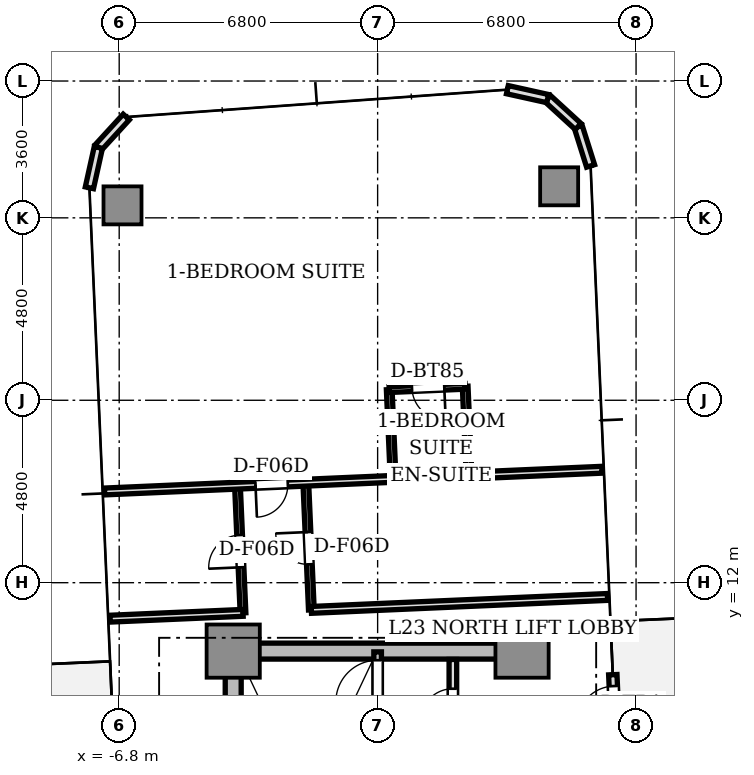
"""IFC4 building model, lengths in metres.
Left out: names, types, materials, properties, quantities, classifications, styles, units other than length and angle.
Written with IfcOpenShell. Run it as: python <this file> out.ifc"""

import sys

from ifc_helpers import new_model, si_unit, direction, frame, frame_2d, origin, origin_2d, place, context, subcontext, project, spatial, rectangle, extrude, source, transform, mapped, element, fill, save


model = new_model("IFC4")
c1 = context("Model", 3, precision=1e-05, world=origin(), true_north=direction((0.0, 1.0)))
c2 = subcontext(c1, "Body", "Model", "MODEL_VIEW")
j1 = project(units=[si_unit("LENGTHUNIT", "METRE"), si_unit("PLANEANGLEUNIT", "RADIAN")], contexts=[c1])
p1 = place(None, origin())
s1 = spatial("IfcSite", under=j1, at=p1, CompositionType="ELEMENT")
p2 = place(p1, origin())
s2 = spatial("IfcBuilding", under=s1, at=p2, CompositionType="ELEMENT")
p3 = place(p2, frame((0.0, 0.0, 86.85)))
s3 = spatial("IfcBuildingStorey", under=s2, at=p3, CompositionType="ELEMENT", Elevation=86.85)
p4 = place(p3, frame((-3.55, 10.2, 0.0), z_axis=(0.0, 0.0, 1.0), x_axis=(1.0, 0.0, 0.0)))
e1 = element("IfcWall", 1, at=p4, inside=s3, PredefinedType="SHEAR", context=c2, shape_type="SweptSolid", body=[
    extrude(rectangle(XDim=7.1, YDim=0.42, at=frame_2d((3.55, 0.0))), origin(), (0.0, 0.0, 1.0), 3.11),
])
p5 = place(p3, frame((-3.8, 2.85, 0.0), z_axis=(0.0, 0.0, 1.0), x_axis=(0.0, 1.0, 0.0)))
e2 = element("IfcWall", 2, at=p5, inside=s3, PredefinedType="SHEAR", context=c2, shape_type="SweptSolid", body=[
    extrude(rectangle(XDim=6.9, YDim=0.42, at=frame_2d((3.45, 0.0))), origin(), (0.0, 0.0, 1.0), 3.11),
])
m1 = source(origin(), c2, "Body", "SweptSolid", [
    extrude(rectangle(XDim=1.4, YDim=1.4, at=origin_2d()), origin(), (0.0, 0.0, 1.0), 3.11),
])
for number, where, z_axis, x_axis in (
    (3, (-3.8, 10.2, 0.0), (0.0, 0.0, 1.0), (1.0, 0.0, 0.0)),
    (4, (3.8, 10.2, 0.0), (0.0, 0.0, 1.0), (1.0, 0.0, 0.0)),
):
    element("IfcColumn", number, at=place(p3, frame(where, z_axis=z_axis, x_axis=x_axis)), inside=s3, PredefinedType="COLUMN", context=c2, shape_type="MappedRepresentation", body=[
        mapped(m1, transform((0.0, 0.0, 0.0), scale=1.0)),
    ])
m2 = source(origin(), c2, "Body", "SweptSolid", [
    extrude(rectangle(XDim=1.0, YDim=1.0, at=origin_2d()), origin(), (0.0, 0.0, 1.0), 3.11),
])
for number, where, z_axis, x_axis in (
    (5, (4.776, 22.43, 0.0), (0.0, 0.0, 1.0), (1.0, 0.0, 0.0)),
    (6, (-6.713, 21.928, 0.0), (0.0, 0.0, 1.0), (1.0, 0.0, 0.0)),
):
    element("IfcColumn", number, at=place(p3, frame(where, z_axis=z_axis, x_axis=x_axis)), inside=s3, PredefinedType="COLUMN", context=c2, shape_type="MappedRepresentation", body=[
        mapped(m2, transform((0.0, 0.0, 0.0), scale=1.0)),
    ])
p6 = place(p3, frame((6.306, 6.882, 0.0), z_axis=(0.0, 0.0, 1.0), x_axis=(-0.043672655174, 0.999045894436, 0.0)))
e7 = element("IfcWall", 7, at=p6, inside=s3, PredefinedType="STANDARD", context=c2, shape_type="SweptSolid", body=[
    extrude(rectangle(XDim=2.7, YDim=0.22, at=frame_2d((1.35, 0.0))), origin(), (0.0, 0.0, 1.0), 3.11),
])
p7 = place(p6, frame((1.4, 0.0, 0.0)))
e8 = element("IfcOpeningElement", 8, at=p7, cuts=e7, PredefinedType="OPENING", context=c2, shape_type="SweptSolid", body=[
    extrude(rectangle(XDim=1.0, YDim=2.2, at=frame_2d((0.5, 1.1))), frame((0.0, 0.12, 0.0), z_axis=(0.0, -1.0, 0.0), x_axis=(1.0, 0.0, 0.0)), (0.0, 0.0, 1.0), 0.24),
])
p8 = place(p3, frame((5.604, 22.966, 0.0), z_axis=(0.0, 0.0, 1.0), x_axis=(-0.300755105707, 0.953701403161, 0.0)))
e9 = element("IfcWall", 9, at=p8, inside=s3, PredefinedType="STANDARD", context=c2, shape_type="SweptSolid", body=[
    extrude(rectangle(XDim=1.087, YDim=0.22, at=frame_2d((0.543, 0.0))), origin(), (0.0, 0.0, 1.0), 3.11),
])
p9 = place(p3, frame((5.277, 24.003, 0.0), z_axis=(0.0, 0.0, 1.0), x_axis=(-0.737312600672, 0.675551721847, 0.0)))
e10 = element("IfcWall", 10, at=p9, inside=s3, PredefinedType="STANDARD", context=c2, shape_type="SweptSolid", body=[
    extrude(rectangle(XDim=1.087, YDim=0.22, at=frame_2d((0.543, 0.0))), origin(), (0.0, 0.0, 1.0), 3.11),
])
for number, where, z_axis, x_axis in (
    (11, (4.475, 24.737, 0.0), (0.0, 0.0, 1.0), (-0.976, 0.217, 0.0)),
    (12, (-6.614, 24.253, 0.0), (0.0, 0.0, 1.0), (-0.676, -0.737, 0.0)),
):
    element("IfcWall", number, at=place(p3, frame(where, z_axis=z_axis, x_axis=x_axis)), inside=s3, PredefinedType="STANDARD", context=c2, shape_type="SweptSolid", body=[
        extrude(rectangle(XDim=1.087, YDim=0.22, at=frame_2d((0.543, 0.0))), origin(), (0.0, 0.0, 1.0), 3.11),
    ])
p10 = place(p3, frame((-7.349, 23.452, 0.0), z_axis=(0.0, 0.0, 1.0), x_axis=(-0.216454939174, -0.976292609471, 0.0)))
e13 = element("IfcWall", 13, at=p10, inside=s3, PredefinedType="STANDARD", context=c2, shape_type="SweptSolid", body=[
    extrude(rectangle(XDim=1.087, YDim=0.22, at=frame_2d((0.544, 0.0))), origin(), (0.0, 0.0, 1.0), 3.11),
])
p11 = place(p3, frame((0.0, 2.5, 0.0), z_axis=(0.0, 0.0, 1.0), x_axis=(0.0, 1.0, 0.0)))
e14 = element("IfcWall", 14, at=p11, inside=s3, PredefinedType="SOLIDWALL", context=c2, shape_type="SweptSolid", body=[
    extrude(rectangle(XDim=7.68, YDim=0.2, at=frame_2d((3.84, 0.0))), origin(), (0.0, 0.0, 1.0), 3.11),
])
p12 = place(p11, frame((6.36, 0.0, 0.0)))
e15 = element("IfcOpeningElement", 15, at=p12, cuts=e14, PredefinedType="OPENING", context=c2, shape_type="SweptSolid", body=[
    extrude(rectangle(XDim=1.1, YDim=2.15, at=frame_2d((0.55, 1.075))), frame((0.0, 0.11, 0.0), z_axis=(0.0, -1.0, 0.0), x_axis=(1.0, 0.0, 0.0)), (0.0, 0.0, 1.0), 0.22),
])
p13 = place(p3, frame((1.98, 5.32, 0.0), z_axis=(0.0, 0.0, 1.0), x_axis=(0.0, 1.0, 0.0)))
e16 = element("IfcWall", 16, at=p13, inside=s3, PredefinedType="SOLIDWALL", context=c2, shape_type="SweptSolid", body=[
    extrude(rectangle(XDim=4.66, YDim=0.2, at=frame_2d((2.33, 0.0))), origin(), (0.0, 0.0, 1.0), 2.66),
])
p14 = place(p13, frame((3.04, 0.0, 0.0)))
e17 = element("IfcOpeningElement", 17, at=p14, cuts=e16, PredefinedType="OPENING", context=c2, shape_type="SweptSolid", body=[
    extrude(rectangle(XDim=0.85, YDim=2.1, at=frame_2d((0.425, 1.05))), frame((0.0, 0.11, 0.0), z_axis=(0.0, -1.0, 0.0), x_axis=(1.0, 0.0, 0.0)), (0.0, 0.0, 1.0), 0.22),
])
p15 = place(p3, frame((-3.542, 11.206, 0.0), z_axis=(0.0, 0.0, 1.0), x_axis=(-0.043582710367, 0.99904982226, 0.0)))
e18 = element("IfcWall", 18, at=p15, inside=s3, PredefinedType="PARTITIONING", context=c2, shape_type="SweptSolid", body=[
    extrude(rectangle(XDim=3.35, YDim=0.15, at=frame_2d((1.675, 0.0))), origin(), (0.0, 0.0, 1.0), 2.66),
])
p16 = place(p15, frame((1.2, 0.0, 0.0)))
e19 = element("IfcOpeningElement", 19, at=p16, cuts=e18, PredefinedType="OPENING", context=c2, shape_type="SweptSolid", body=[
    extrude(rectangle(XDim=0.85, YDim=2.1, at=frame_2d((0.425, 1.05))), frame((0.0, 0.085, 0.0), z_axis=(0.0, -1.0, 0.0), x_axis=(1.0, 0.0, 0.0)), (0.0, 0.0, 1.0), 0.17),
])
p17 = place(p3, frame((-1.744, 11.285, 0.0), z_axis=(0.0, 0.0, 1.0), x_axis=(-0.043579537274, 0.999049960678, 0.0)))
e20 = element("IfcWall", 20, at=p17, inside=s3, PredefinedType="PARTITIONING", context=c2, shape_type="SweptSolid", body=[
    extrude(rectangle(XDim=3.35, YDim=0.15, at=frame_2d((1.675, 0.0))), origin(), (0.0, 0.0, 1.0), 2.66),
])
p18 = place(p17, frame((1.2, 0.0, 0.0)))
e21 = element("IfcOpeningElement", 21, at=p18, cuts=e20, PredefinedType="OPENING", context=c2, shape_type="SweptSolid", body=[
    extrude(rectangle(XDim=0.85, YDim=2.1, at=frame_2d((0.425, 1.05))), frame((0.0, 0.085, 0.0), z_axis=(0.0, -1.0, 0.0), x_axis=(1.0, 0.0, 0.0)), (0.0, 0.0, 1.0), 0.17),
])
p19 = place(p3, frame((-3.542, 11.206, 0.0), z_axis=(0.0, 0.0, 1.0), x_axis=(-0.999046129111, -0.04366728647, 0.0)))
e22 = element("IfcWall", 22, at=p19, inside=s3, PredefinedType="PARTITIONING", context=c2, shape_type="SweptSolid", body=[
    extrude(rectangle(XDim=3.5, YDim=0.18, at=frame_2d((1.75, 0.0))), origin(), (0.0, 0.0, 1.0), 2.66),
])
p20 = place(p3, frame((6.049, 11.625, 0.0), z_axis=(0.0, 0.0, 1.0), x_axis=(-0.999047634936, -0.043632821702, 0.0)))
e23 = element("IfcWall", 23, at=p20, inside=s3, PredefinedType="PARTITIONING", context=c2, shape_type="SweptSolid", body=[
    extrude(rectangle(XDim=7.8, YDim=0.18, at=frame_2d((3.9, 0.0))), origin(), (0.0, 0.0, 1.0), 2.66),
])
p21 = place(p3, frame((5.903, 14.972, 0.0), z_axis=(0.0, 0.0, 1.0), x_axis=(-0.999048653727, -0.043609488494, 0.0)))
e24 = element("IfcWall", 24, at=p21, inside=s3, PredefinedType="PARTITIONING", context=c2, shape_type="SweptSolid", body=[
    extrude(rectangle(XDim=13.1, YDim=0.18, at=frame_2d((6.55, 0.0))), origin(), (0.0, 0.0, 1.0), 2.66),
])
p22 = place(p21, frame((8.275, 0.0, 0.0)))
e25 = element("IfcOpeningElement", 25, at=p22, cuts=e24, PredefinedType="OPENING", context=c2, shape_type="SweptSolid", body=[
    extrude(rectangle(XDim=0.85, YDim=2.1, at=frame_2d((0.425, 1.05))), frame((0.0, 0.1, 0.0), z_axis=(0.0, -1.0, 0.0), x_axis=(1.0, 0.0, 0.0)), (0.0, 0.0, 1.0), 0.2),
])
p23 = place(p3, frame((0.408, 14.732, 0.0), z_axis=(0.0, 0.0, 1.0), x_axis=(-0.043527387554, 0.999052234136, 0.0)))
e26 = element("IfcWall", 26, at=p23, inside=s3, PredefinedType="PARTITIONING", context=c2, shape_type="SweptSolid", body=[
    extrude(rectangle(XDim=2.35, YDim=0.15, at=frame_2d((1.175, 0.0))), origin(), (0.0, 0.0, 1.0), 2.66),
])
p24 = place(p3, frame((2.406, 14.819, 0.0), z_axis=(0.0, 0.0, 1.0), x_axis=(-0.04363560271, 0.999047513473, 0.0)))
e27 = element("IfcWall", 27, at=p24, inside=s3, PredefinedType="PARTITIONING", context=c2, shape_type="SweptSolid", body=[
    extrude(rectangle(XDim=2.35, YDim=0.15, at=frame_2d((1.175, 0.0))), origin(), (0.0, 0.0, 1.0), 2.66),
])
p25 = place(p3, frame((2.303, 17.167, 0.0), z_axis=(0.0, 0.0, 1.0), x_axis=(-0.999049929275, -0.043580257179, 0.0)))
e28 = element("IfcWall", 28, at=p25, inside=s3, PredefinedType="PARTITIONING", context=c2, shape_type="SweptSolid", body=[
    extrude(rectangle(XDim=2.0, YDim=0.15, at=frame_2d((1.0, 0.0))), origin(), (0.0, 0.0, 1.0), 2.66),
])
p26 = place(p25, frame((0.55, 0.0, 0.0)))
e29 = element("IfcOpeningElement", 29, at=p26, cuts=e28, PredefinedType="OPENING", context=c2, shape_type="SweptSolid", body=[
    extrude(rectangle(XDim=0.85, YDim=2.1, at=frame_2d((0.425, 1.05))), frame((0.0, 0.085, 0.0), z_axis=(0.0, -1.0, 0.0), x_axis=(1.0, 0.0, 0.0)), (0.0, 0.0, 1.0), 0.17),
])
m3 = source(origin(), c2, "Body", "SweptSolid", [
    extrude(rectangle(XDim=1.0, YDim=0.05, at=origin_2d()), origin(), (0.0, 0.0, 1.0), 2.2),
])
p27 = place(p7, frame((0.5, 0.0, 0.0)))
e30 = element("IfcDoor", 30, at=p27, inside=s3, OperationType="SINGLE_SWING_LEFT", PredefinedType="DOOR", context=c2, shape_type="MappedRepresentation", body=[
    mapped(m3, transform((0.0, 0.0, 0.0), scale=1.0)),
])
fill(e8, e30)
m4 = source(origin(), c2, "Body", "SweptSolid", [
    extrude(rectangle(XDim=1.1, YDim=0.05, at=origin_2d()), origin(), (0.0, 0.0, 1.0), 2.15),
])
p28 = place(p12, frame((0.55, 0.0, 0.0)))
e31 = element("IfcDoor", 31, at=p28, inside=s3, OperationType="SINGLE_SWING_LEFT", PredefinedType="DOOR", context=c2, shape_type="MappedRepresentation", body=[
    mapped(m4, transform((0.0, 0.0, 0.0), scale=1.0)),
])
fill(e15, e31)
m5 = source(origin(), c2, "Body", "SweptSolid", [
    extrude(rectangle(XDim=0.85, YDim=0.05, at=origin_2d()), origin(), (0.0, 0.0, 1.0), 2.1),
])
p29 = place(p14, frame((0.425, 0.0, 0.0)))
e32 = element("IfcDoor", 32, at=p29, inside=s3, OperationType="SINGLE_SWING_LEFT", PredefinedType="DOOR", context=c2, shape_type="MappedRepresentation", body=[
    mapped(m5, transform((0.0, 0.0, 0.0), scale=1.0)),
])
fill(e17, e32)
p30 = place(p16, frame((0.425, 0.0, 0.0)))
e33 = element("IfcDoor", 33, at=p30, inside=s3, OperationType="SINGLE_SWING_LEFT", PredefinedType="DOOR", context=c2, shape_type="MappedRepresentation", body=[
    mapped(m5, transform((0.0, 0.0, 0.0), scale=1.0)),
])
fill(e19, e33)
p31 = place(p18, frame((0.425, 0.0, 0.0)))
e34 = element("IfcDoor", 34, at=p31, inside=s3, OperationType="SINGLE_SWING_RIGHT", PredefinedType="DOOR", context=c2, shape_type="MappedRepresentation", body=[
    mapped(m5, transform((0.0, 0.0, 0.0), scale=1.0)),
])
fill(e21, e34)
p32 = place(p26, frame((0.425, 0.0, 0.0)))
e35 = element("IfcDoor", 35, at=p32, inside=s3, OperationType="SINGLE_SWING_LEFT", PredefinedType="DOOR", context=c2, shape_type="MappedRepresentation", body=[
    mapped(m5, transform((0.0, 0.0, 0.0), scale=1.0)),
])
fill(e29, e35)
p33 = place(p22, frame((0.425, 0.0, 0.0)))
e36 = element("IfcDoor", 36, at=p33, inside=s3, OperationType="SINGLE_SWING_RIGHT", PredefinedType="DOOR", context=c2, shape_type="MappedRepresentation", body=[
    mapped(m5, transform((0.0, 0.0, 0.0), scale=1.0)),
])
fill(e25, e36)
save(model, sys.argv[1])
